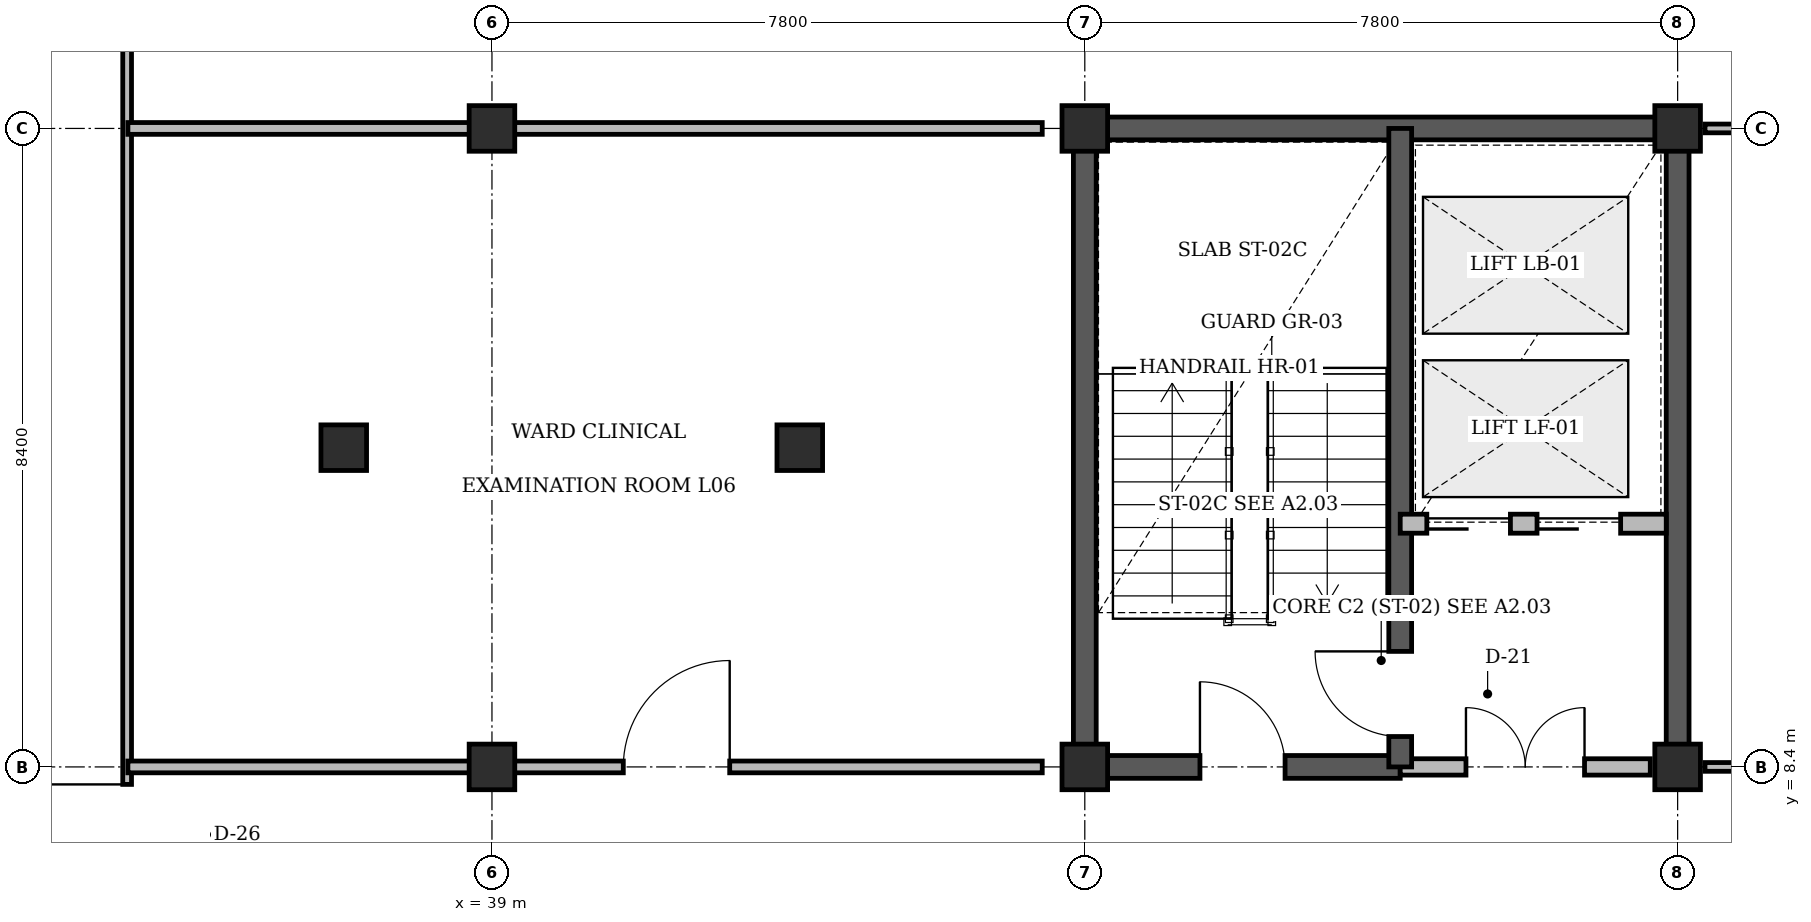
"""IFC4 building model, lengths in metres.
Left out: names, types, materials, properties, quantities, classifications, styles, units other than length and angle.
Written with IfcOpenShell. Run it as: python <this file> out.ifc"""

import sys

from ifc_helpers import new_model, si_unit, direction, frame, frame_2d, origin, origin_2d, place, context, subcontext, project, spatial, rectangle, circle, extrude, element, fill, save


model = new_model("IFC4")
c1 = context("Model", 3, precision=1e-05, world=origin(), true_north=direction((0.0, 1.0)))
c2 = subcontext(c1, "Body", "Model", "MODEL_VIEW")
j1 = project(units=[si_unit("LENGTHUNIT", "METRE"), si_unit("PLANEANGLEUNIT", "RADIAN")], contexts=[c1])
p1 = place(None, origin())
s1 = spatial("IfcSite", under=j1, at=p1, CompositionType="ELEMENT")
p2 = place(p1, origin())
s2 = spatial("IfcBuilding", under=s1, at=p2, CompositionType="ELEMENT")
p3 = place(p2, frame((0.0, 0.0, 26.4)))
s3 = spatial("IfcBuildingStorey", under=s2, at=p3, CompositionType="ELEMENT", Elevation=26.4)
p4 = place(p3, frame((46.65, 16.8, 0.0), z_axis=(0.0, 0.0, 1.0), x_axis=(1.0, 0.0, 0.0)))
e1 = element("IfcWall", 1, at=p4, inside=s3, PredefinedType="SHEAR", context=c2, shape_type="SweptSolid", body=[
    extrude(rectangle(XDim=8.1, YDim=0.3, at=frame_2d((4.05, 0.0))), origin(), (0.0, 0.0, 1.0), 3.92),
])
for number, where, z_axis, x_axis in (
    (2, (46.8, 8.4, 0.0), (0.0, 0.0, 1.0), (0.0, 1.0, 0.0)),
    (3, (54.6, 8.4, 0.0), (0.0, 0.0, 1.0), (0.0, 1.0, 0.0)),
):
    element("IfcWall", number, at=place(p3, frame(where, z_axis=z_axis, x_axis=x_axis)), inside=s3, PredefinedType="SHEAR", context=c2, shape_type="SweptSolid", body=[
        extrude(rectangle(XDim=8.4, YDim=0.3, at=frame_2d((4.2, 0.0))), origin(), (0.0, 0.0, 1.0), 3.92),
    ])
for number, where, z_axis, x_axis in (
    (4, (39.0, 8.4, 0.0), (0.0, 0.0, 1.0), (1.0, 0.0, 0.0)),
    (5, (39.0, 16.8, 0.0), (0.0, 0.0, 1.0), (1.0, 0.0, 0.0)),
    (6, (46.8, 8.4, 0.0), (0.0, 0.0, 1.0), (1.0, 0.0, 0.0)),
    (7, (46.8, 16.8, 0.0), (0.0, 0.0, 1.0), (1.0, 0.0, 0.0)),
    (8, (54.6, 8.4, 0.0), (0.0, 0.0, 1.0), (1.0, 0.0, 0.0)),
    (9, (54.6, 16.8, 0.0), (0.0, 0.0, 1.0), (1.0, 0.0, 0.0)),
):
    element("IfcColumn", number, at=place(p3, frame(where, z_axis=z_axis, x_axis=x_axis)), inside=s3, PredefinedType="COLUMN", context=c2, shape_type="SweptSolid", body=[
        extrude(rectangle(XDim=0.6, YDim=0.6, at=origin_2d()), origin(), (0.0, 0.0, 1.0), 4.2),
    ])
for number, where, z_axis, x_axis in (
    (10, (37.05, 12.6, 0.0), (0.0, 0.0, 1.0), (1.0, 0.0, 0.0)),
    (11, (43.05, 12.6, 0.0), (0.0, 0.0, 1.0), (1.0, 0.0, 0.0)),
):
    element("IfcColumn", number, at=place(p3, frame(where, z_axis=z_axis, x_axis=x_axis)), inside=s3, PredefinedType="PILASTER", context=c2, shape_type="SweptSolid", body=[
        extrude(circle(Radius=0.3, at=origin_2d()), origin(), (0.0, 0.0, 1.0), 4.2),
    ])
p5 = place(p3, frame((46.8, 8.4, 0.0), z_axis=(0.0, 0.0, 1.0), x_axis=(1.0, 0.0, 0.0)))
e12 = element("IfcWall", 12, at=p5, inside=s3, PredefinedType="SHEAR", context=c2, shape_type="SweptSolid", body=[
    extrude(rectangle(XDim=4.15, YDim=0.3, at=frame_2d((2.075, 0.0))), origin(), (0.0, 0.0, 1.0), 4.2),
])
p6 = place(p5, frame((1.515, 0.0, 0.0)))
e13 = element("IfcOpeningElement", 13, at=p6, cuts=e12, PredefinedType="OPENING", context=c2, shape_type="SweptSolid", body=[
    extrude(rectangle(XDim=1.12, YDim=2.15, at=frame_2d((0.56, 1.075))), frame((0.0, 0.16, 0.0), z_axis=(0.0, -1.0, 0.0), x_axis=(1.0, 0.0, 0.0)), (0.0, 0.0, 1.0), 0.32),
])
p7 = place(p3, frame((50.95, 8.4, 0.0), z_axis=(0.0, 0.0, 1.0), x_axis=(1.0, 0.0, 0.0)))
e14 = element("IfcWall", 14, at=p7, inside=s3, PredefinedType="STANDARD", context=c2, shape_type="SweptSolid", body=[
    extrude(rectangle(XDim=3.29, YDim=0.215, at=frame_2d((1.645, 0.0))), origin(), (0.0, 0.0, 1.0), 3.27),
])
p8 = place(p7, frame((0.865, 0.0, 0.0)))
e15 = element("IfcOpeningElement", 15, at=p8, cuts=e14, PredefinedType="OPENING", context=c2, shape_type="SweptSolid", body=[
    extrude(rectangle(XDim=1.56, YDim=2.2, at=frame_2d((0.78, 1.1))), frame((0.0, 0.118, 0.0), z_axis=(0.0, -1.0, 0.0), x_axis=(1.0, 0.0, 0.0)), (0.0, 0.0, 1.0), 0.235),
])
p9 = place(p3, frame((50.95, 8.4, 0.0), z_axis=(0.0, 0.0, 1.0), x_axis=(0.0, 1.0, 0.0)))
e16 = element("IfcWall", 16, at=p9, inside=s3, PredefinedType="SHEAR", context=c2, shape_type="SweptSolid", body=[
    extrude(rectangle(XDim=8.4, YDim=0.3, at=frame_2d((4.2, 0.0))), origin(), (0.0, 0.0, 1.0), 4.2),
])
p10 = place(p9, frame((0.4, 0.0, 0.0)))
e17 = element("IfcOpeningElement", 17, at=p10, cuts=e16, PredefinedType="OPENING", context=c2, shape_type="SweptSolid", body=[
    extrude(rectangle(XDim=1.12, YDim=2.15, at=frame_2d((0.56, 1.075))), frame((0.0, 0.16, 0.0), z_axis=(0.0, -1.0, 0.0), x_axis=(1.0, 0.0, 0.0)), (0.0, 0.0, 1.0), 0.32),
])
p11 = place(p3, frame((50.95, 11.6, 0.0), z_axis=(0.0, 0.0, 1.0), x_axis=(1.0, 0.0, 0.0)))
e18 = element("IfcWall", 18, at=p11, inside=s3, PredefinedType="STANDARD", context=c2, shape_type="SweptSolid", body=[
    extrude(rectangle(XDim=3.5, YDim=0.25, at=frame_2d((1.75, 0.0))), origin(), (0.0, 0.0, 1.0), 3.9),
])
p12 = place(p11, frame((0.35, 0.0, 0.0)))
e19 = element("IfcOpeningElement", 19, at=p12, cuts=e18, PredefinedType="OPENING", context=c2, shape_type="SweptSolid", body=[
    extrude(rectangle(XDim=1.1, YDim=2.2, at=frame_2d((0.55, 1.1))), frame((0.0, 0.135, 0.0), z_axis=(0.0, -1.0, 0.0), x_axis=(1.0, 0.0, 0.0)), (0.0, 0.0, 1.0), 0.27),
])
p13 = place(p11, frame((1.8, 0.0, 0.0)))
e20 = element("IfcOpeningElement", 20, at=p13, cuts=e18, PredefinedType="OPENING", context=c2, shape_type="SweptSolid", body=[
    extrude(rectangle(XDim=1.1, YDim=2.2, at=frame_2d((0.55, 1.1))), frame((0.0, 0.135, 0.0), z_axis=(0.0, -1.0, 0.0), x_axis=(1.0, 0.0, 0.0)), (0.0, 0.0, 1.0), 0.27),
])
p14 = place(p3, frame((34.2, 6.0, 0.0), z_axis=(0.0, 0.0, 1.0), x_axis=(0.0, 1.0, 0.0)))
e21 = element("IfcWall", 21, at=p14, inside=s3, PredefinedType="PARTITIONING", context=c2, shape_type="SweptSolid", body=[
    extrude(rectangle(XDim=13.2, YDim=0.115, at=frame_2d((6.6, 0.0))), origin(), (0.0, 0.0, 1.0), 3.9),
])
p15 = place(p14, frame((0.85, 0.0, 0.0)))
e22 = element("IfcOpeningElement", 22, at=p15, cuts=e21, PredefinedType="OPENING", context=c2, shape_type="SweptSolid", body=[
    extrude(rectangle(XDim=1.32, YDim=2.15, at=frame_2d((0.66, 1.075))), frame((0.0, 0.067, 0.0), z_axis=(0.0, -1.0, 0.0), x_axis=(1.0, 0.0, 0.0)), (0.0, 0.0, 1.0), 0.135),
])
p16 = place(p3, frame((54.96, 8.4, 0.0), z_axis=(0.0, 0.0, 1.0), x_axis=(1.0, 0.0, 0.0)))
e23 = element("IfcWall", 23, at=p16, inside=s3, PredefinedType="PARTITIONING", context=c2, shape_type="SweptSolid", body=[
    extrude(rectangle(XDim=7.08, YDim=0.115, at=frame_2d((3.54, 0.0))), origin(), (0.0, 0.0, 1.0), 3.27),
])
p17 = place(p16, frame((2.88, 0.0, 0.0)))
e24 = element("IfcOpeningElement", 24, at=p17, cuts=e23, PredefinedType="OPENING", context=c2, shape_type="SweptSolid", body=[
    extrude(rectangle(XDim=1.32, YDim=2.15, at=frame_2d((0.66, 1.075))), frame((0.0, 0.067, 0.0), z_axis=(0.0, -1.0, 0.0), x_axis=(1.0, 0.0, 0.0)), (0.0, 0.0, 1.0), 0.135),
])
p18 = place(p3, frame((54.96, 16.8, 0.0), z_axis=(0.0, 0.0, 1.0), x_axis=(1.0, 0.0, 0.0)))
e25 = element("IfcWall", 25, at=p18, inside=s3, PredefinedType="PARTITIONING", context=c2, shape_type="SweptSolid", body=[
    extrude(rectangle(XDim=7.08, YDim=0.115, at=frame_2d((3.54, 0.0))), origin(), (0.0, 0.0, 1.0), 3.27),
])
p19 = place(p3, frame((34.21, 8.4, 0.0), z_axis=(0.0, 0.0, 1.0), x_axis=(1.0, 0.0, 0.0)))
e26 = element("IfcWall", 26, at=p19, inside=s3, PredefinedType="PARTITIONING", context=c2, shape_type="SweptSolid", body=[
    extrude(rectangle(XDim=12.03, YDim=0.155, at=frame_2d((6.015, 0.0))), origin(), (0.0, 0.0, 1.0), 3.27),
])
p20 = place(p19, frame((6.518, 0.0, 0.0)))
e27 = element("IfcOpeningElement", 27, at=p20, cuts=e26, PredefinedType="OPENING", context=c2, shape_type="SweptSolid", body=[
    extrude(rectangle(XDim=1.4, YDim=2.2, at=frame_2d((0.7, 1.1))), frame((0.0, 0.087, 0.0), z_axis=(0.0, -1.0, 0.0), x_axis=(1.0, 0.0, 0.0)), (0.0, 0.0, 1.0), 0.175),
])
p21 = place(p3, frame((34.21, 16.8, 0.0), z_axis=(0.0, 0.0, 1.0), x_axis=(1.0, 0.0, 0.0)))
e28 = element("IfcWall", 28, at=p21, inside=s3, PredefinedType="PARTITIONING", context=c2, shape_type="SweptSolid", body=[
    extrude(rectangle(XDim=12.03, YDim=0.155, at=frame_2d((6.015, 0.0))), origin(), (0.0, 0.0, 1.0), 3.27),
])
p22 = place(p6, origin())
e29 = element("IfcDoor", 29, at=p22, inside=s3, OperationType="SINGLE_SWING_LEFT", PredefinedType="DOOR", context=c2, shape_type="SweptSolid", body=[
    extrude(rectangle(XDim=1.12, YDim=2.15, at=frame_2d((0.56, 1.075))), frame((0.0, 0.025, 0.0), z_axis=(0.0, -1.0, 0.0), x_axis=(1.0, 0.0, 0.0)), (0.0, 0.0, 1.0), 0.05),
])
fill(e13, e29)
p23 = place(p8, origin())
e30 = element("IfcDoor", 30, at=p23, inside=s3, OperationType="DOUBLE_DOOR_SINGLE_SWING", PredefinedType="DOOR", context=c2, shape_type="SweptSolid", body=[
    extrude(rectangle(XDim=1.56, YDim=2.2, at=frame_2d((0.78, 1.1))), frame((0.0, 0.025, 0.0), z_axis=(0.0, -1.0, 0.0), x_axis=(1.0, 0.0, 0.0)), (0.0, 0.0, 1.0), 0.05),
])
fill(e15, e30)
p24 = place(p10, origin())
e31 = element("IfcDoor", 31, at=p24, inside=s3, OperationType="SINGLE_SWING_RIGHT", PredefinedType="DOOR", context=c2, shape_type="SweptSolid", body=[
    extrude(rectangle(XDim=1.12, YDim=2.15, at=frame_2d((0.56, 1.075))), frame((0.0, 0.025, 0.0), z_axis=(0.0, -1.0, 0.0), x_axis=(1.0, 0.0, 0.0)), (0.0, 0.0, 1.0), 0.05),
])
fill(e17, e31)
p25 = place(p12, origin())
e32 = element("IfcDoor", 32, at=p25, inside=s3, OperationType="SLIDING_TO_LEFT", PredefinedType="DOOR", context=c2, shape_type="SweptSolid", body=[
    extrude(rectangle(XDim=1.1, YDim=2.2, at=frame_2d((0.55, 1.1))), frame((0.0, 0.025, 0.0), z_axis=(0.0, -1.0, 0.0), x_axis=(1.0, 0.0, 0.0)), (0.0, 0.0, 1.0), 0.05),
])
fill(e19, e32)
p26 = place(p13, origin())
e33 = element("IfcDoor", 33, at=p26, inside=s3, OperationType="SLIDING_TO_LEFT", PredefinedType="DOOR", context=c2, shape_type="SweptSolid", body=[
    extrude(rectangle(XDim=1.1, YDim=2.2, at=frame_2d((0.55, 1.1))), frame((0.0, 0.025, 0.0), z_axis=(0.0, -1.0, 0.0), x_axis=(1.0, 0.0, 0.0)), (0.0, 0.0, 1.0), 0.05),
])
fill(e20, e33)
p27 = place(p15, origin())
e34 = element("IfcDoor", 34, at=p27, inside=s3, OperationType="SINGLE_SWING_RIGHT", PredefinedType="DOOR", context=c2, shape_type="SweptSolid", body=[
    extrude(rectangle(XDim=1.32, YDim=2.15, at=frame_2d((0.66, 1.075))), frame((0.0, 0.025, 0.0), z_axis=(0.0, -1.0, 0.0), x_axis=(1.0, 0.0, 0.0)), (0.0, 0.0, 1.0), 0.05),
])
fill(e22, e34)
p28 = place(p20, origin())
e35 = element("IfcDoor", 35, at=p28, inside=s3, OperationType="SINGLE_SWING_RIGHT", PredefinedType="DOOR", context=c2, shape_type="SweptSolid", body=[
    extrude(rectangle(XDim=1.4, YDim=2.2, at=frame_2d((0.7, 1.1))), frame((0.0, 0.025, 0.0), z_axis=(0.0, -1.0, 0.0), x_axis=(1.0, 0.0, 0.0)), (0.0, 0.0, 1.0), 0.05),
])
fill(e27, e35)
save(model, sys.argv[1])
